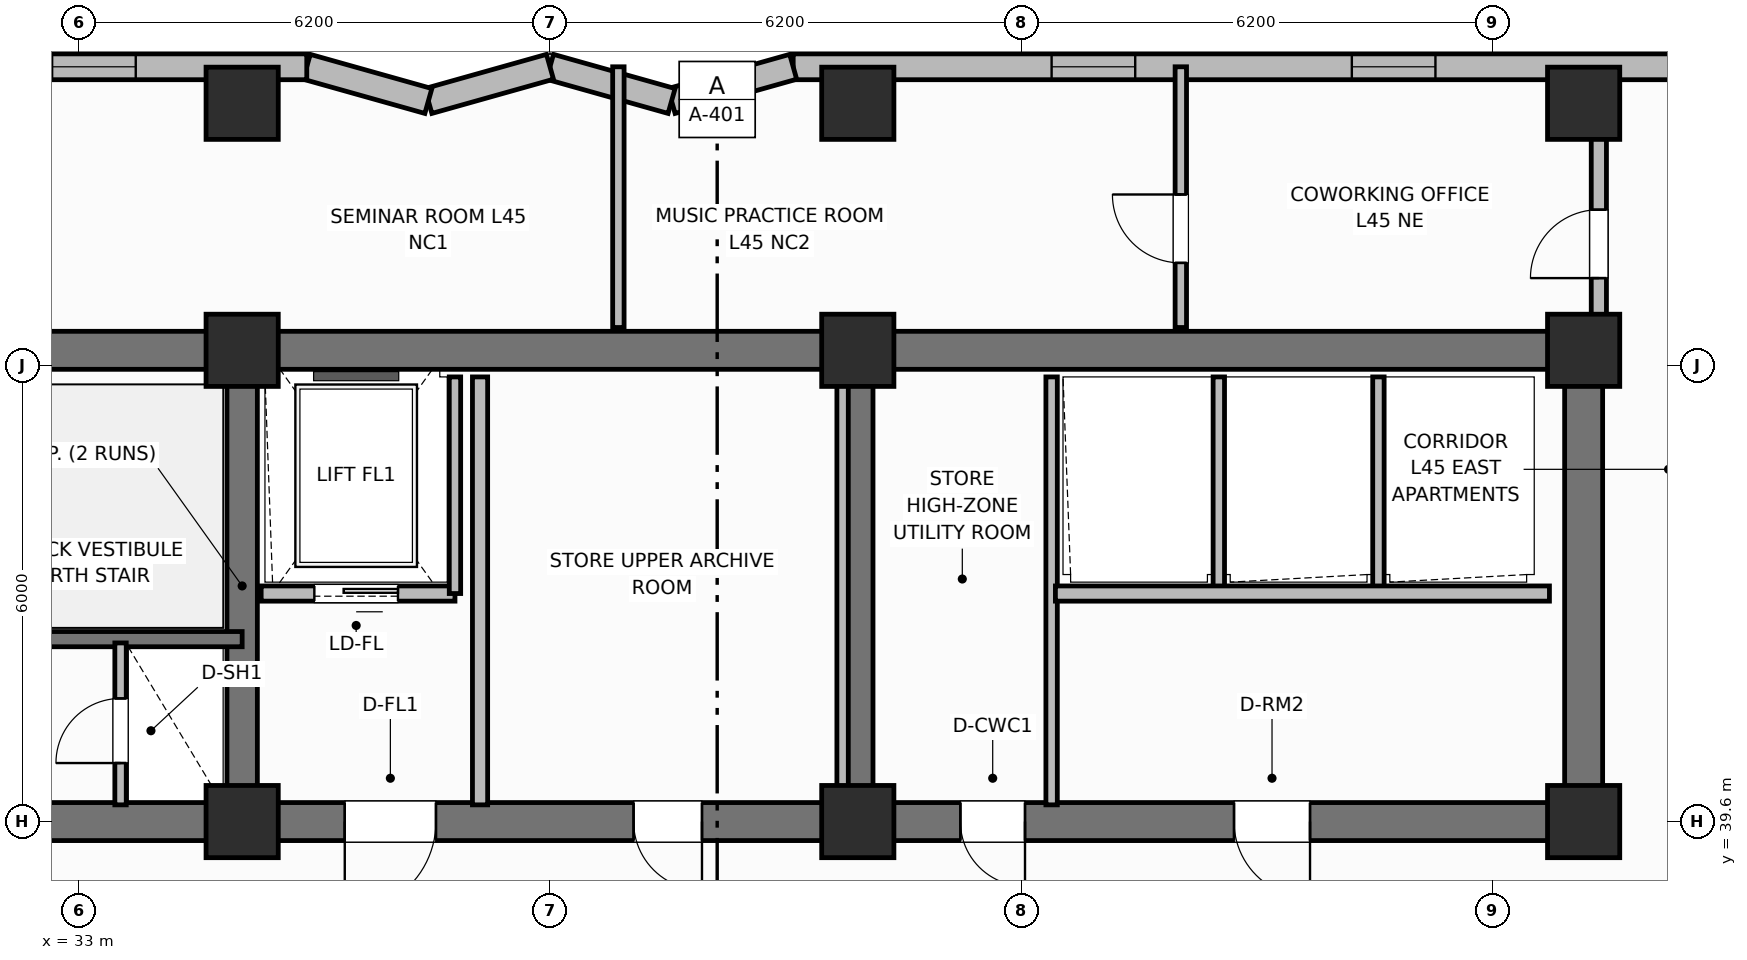
"""IFC4 building model, lengths in metres.
Left out: names, types, materials, properties, quantities, classifications, styles, units other than length and angle.
Written with IfcOpenShell. Run it as: python <this file> out.ifc"""

import sys

from ifc_helpers import new_model, si_unit, direction, frame, frame_2d, origin, origin_2d, place, context, subcontext, project, spatial, rectangle, extrude, element, fill, save


model = new_model("IFC4")
c1 = context("Model", 3, precision=1e-05, world=origin(), true_north=direction((0.0, 1.0)))
c2 = subcontext(c1, "Body", "Model", "MODEL_VIEW")
j1 = project(units=[si_unit("LENGTHUNIT", "METRE"), si_unit("PLANEANGLEUNIT", "RADIAN")], contexts=[c1])
p1 = place(None, origin())
s1 = spatial("IfcSite", under=j1, at=p1, CompositionType="ELEMENT")
p2 = place(p1, origin())
s2 = spatial("IfcBuilding", under=s1, at=p2, CompositionType="ELEMENT")
p3 = place(p2, frame((0.0, 0.0, 181.1)))
s3 = spatial("IfcBuildingStorey", under=s2, at=p3, CompositionType="ELEMENT", Elevation=181.1)
p4 = place(p3, frame((25.6, 45.8, 0.0), z_axis=(0.0, 0.0, 1.0), x_axis=(1.0, 0.0, 0.0)))
e1 = element("IfcWall", 1, at=p4, inside=s3, PredefinedType="SHEAR", context=c2, shape_type="SweptSolid", body=[
    extrude(rectangle(XDim=27.2, YDim=0.5, at=frame_2d((13.6, 0.0))), origin(), (0.0, 0.0, 1.0), 3.7),
])
p5 = place(p3, frame((52.8, 39.85, 0.0), z_axis=(0.0, 0.0, 1.0), x_axis=(0.0, 1.0, 0.0)))
e2 = element("IfcWall", 2, at=p5, inside=s3, PredefinedType="SHEAR", context=c2, shape_type="SweptSolid", body=[
    extrude(rectangle(XDim=5.7, YDim=0.5, at=frame_2d((2.85, 0.0))), origin(), (0.0, 0.0, 1.0), 3.7),
])
p6 = place(p3, frame((52.8, 39.6, 0.0), z_axis=(0.0, 0.0, 1.0), x_axis=(-1.0, 0.0, 0.0)))
e3 = element("IfcWall", 3, at=p6, inside=s3, PredefinedType="SHEAR", context=c2, shape_type="SweptSolid", body=[
    extrude(rectangle(XDim=27.2, YDim=0.5, at=frame_2d((13.6, 0.0))), origin(), (0.0, 0.0, 1.0), 3.7),
])
p7 = place(p6, frame((24.2, 0.0, 0.0)))
e4 = element("IfcOpeningElement", 4, at=p7, cuts=e3, PredefinedType="OPENING", context=c2, shape_type="SweptSolid", body=[
    extrude(rectangle(XDim=1.1, YDim=2.15, at=frame_2d((0.55, 1.075))), frame((0.0, 0.26, 0.0), z_axis=(0.0, -1.0, 0.0), x_axis=(1.0, 0.0, 0.0)), (0.0, 0.0, 1.0), 0.52),
])
p8 = place(p6, frame((15.1, 0.0, 0.0)))
e5 = element("IfcOpeningElement", 5, at=p8, cuts=e3, PredefinedType="OPENING", context=c2, shape_type="SweptSolid", body=[
    extrude(rectangle(XDim=1.2, YDim=2.15, at=frame_2d((0.6, 1.075))), frame((0.0, 0.26, 0.0), z_axis=(0.0, -1.0, 0.0), x_axis=(1.0, 0.0, 0.0)), (0.0, 0.0, 1.0), 0.52),
])
p9 = place(p6, frame((11.6, 0.0, 0.0)))
e6 = element("IfcOpeningElement", 6, at=p9, cuts=e3, PredefinedType="OPENING", context=c2, shape_type="SweptSolid", body=[
    extrude(rectangle(XDim=0.9, YDim=2.1, at=frame_2d((0.45, 1.05))), frame((0.0, 0.26, 0.0), z_axis=(0.0, -1.0, 0.0), x_axis=(1.0, 0.0, 0.0)), (0.0, 0.0, 1.0), 0.52),
])
p10 = place(p6, frame((7.35, 0.0, 0.0)))
e7 = element("IfcOpeningElement", 7, at=p10, cuts=e3, PredefinedType="OPENING", context=c2, shape_type="SweptSolid", body=[
    extrude(rectangle(XDim=0.85, YDim=2.1, at=frame_2d((0.425, 1.05))), frame((0.0, 0.26, 0.0), z_axis=(0.0, -1.0, 0.0), x_axis=(1.0, 0.0, 0.0)), (0.0, 0.0, 1.0), 0.52),
])
p11 = place(p6, frame((3.6, 0.0, 0.0)))
e8 = element("IfcOpeningElement", 8, at=p11, cuts=e3, PredefinedType="OPENING", context=c2, shape_type="SweptSolid", body=[
    extrude(rectangle(XDim=1.0, YDim=2.15, at=frame_2d((0.5, 1.075))), frame((0.0, 0.26, 0.0), z_axis=(0.0, -1.0, 0.0), x_axis=(1.0, 0.0, 0.0)), (0.0, 0.0, 1.0), 0.52),
])
for number, where, z_axis, x_axis in (
    (9, (35.15, 39.85, 0.0), (0.0, 0.0, 1.0), (0.0, 1.0, 0.0)),
    (10, (43.25, 39.85, 0.0), (0.0, 0.0, 1.0), (0.0, 1.0, 0.0)),
):
    element("IfcWall", number, at=place(p3, frame(where, z_axis=z_axis, x_axis=x_axis)), inside=s3, PredefinedType="SHEAR", context=c2, shape_type="SweptSolid", body=[
        extrude(rectangle(XDim=5.7, YDim=0.4, at=frame_2d((2.85, 0.0))), origin(), (0.0, 0.0, 1.0), 3.7),
    ])
for number, where, z_axis, x_axis in (
    (11, (35.15, 39.6, 0.0), (0.0, 0.0, 1.0), (1.0, 0.0, 0.0)),
    (12, (35.15, 45.8, 0.0), (0.0, 0.0, 1.0), (1.0, 0.0, 0.0)),
    (13, (43.25, 39.6, 0.0), (0.0, 0.0, 1.0), (1.0, 0.0, 0.0)),
    (14, (43.25, 45.8, 0.0), (0.0, 0.0, 1.0), (1.0, 0.0, 0.0)),
    (15, (52.8, 39.6, 0.0), (0.0, 0.0, 1.0), (1.0, 0.0, 0.0)),
    (16, (52.8, 45.8, 0.0), (0.0, 0.0, 1.0), (1.0, 0.0, 0.0)),
    (17, (35.15, 49.05, 0.0), (0.0, 0.0, 1.0), (1.0, 0.0, 0.0)),
    (18, (43.25, 49.05, 0.0), (0.0, 0.0, 1.0), (1.0, 0.0, 0.0)),
    (19, (52.8, 49.05, 0.0), (0.0, 0.0, 1.0), (1.0, 0.0, 0.0)),
):
    element("IfcColumn", number, at=place(p3, frame(where, z_axis=z_axis, x_axis=x_axis)), inside=s3, PredefinedType="COLUMN", context=c2, shape_type="SweptSolid", body=[
        extrude(rectangle(XDim=0.95, YDim=0.95, at=origin_2d()), origin(), (0.0, 0.0, 1.0), 3.7),
    ])
p12 = place(p3, frame((58.2, 49.53, 0.0), z_axis=(0.0, 0.0, 1.0), x_axis=(-1.0, 0.0, 0.0)))
e20 = element("IfcWall", 20, at=p12, inside=s3, PredefinedType="SOLIDWALL", context=c2, shape_type="SweptSolid", body=[
    extrude(rectangle(XDim=15.8, YDim=0.34, at=frame_2d((7.9, 0.0))), origin(), (0.0, 0.0, 1.0), 2.72),
])
p13 = place(p12, frame((1.55, 0.0, 0.95)))
e21 = element("IfcOpeningElement", 21, at=p13, cuts=e20, PredefinedType="OPENING", context=c2, shape_type="SweptSolid", body=[
    extrude(rectangle(XDim=1.1, YDim=1.65, at=frame_2d((0.55, 0.825))), frame((0.0, 0.18, 0.0), z_axis=(0.0, -1.0, 0.0), x_axis=(1.0, 0.0, 0.0)), (0.0, 0.0, 1.0), 0.36),
])
p14 = place(p12, frame((7.35, 0.0, 0.95)))
e22 = element("IfcOpeningElement", 22, at=p14, cuts=e20, PredefinedType="OPENING", context=c2, shape_type="SweptSolid", body=[
    extrude(rectangle(XDim=1.1, YDim=1.65, at=frame_2d((0.55, 0.825))), frame((0.0, 0.18, 0.0), z_axis=(0.0, -1.0, 0.0), x_axis=(1.0, 0.0, 0.0)), (0.0, 0.0, 1.0), 0.36),
])
p15 = place(p12, frame((11.3, 0.0, 0.95)))
e23 = element("IfcOpeningElement", 23, at=p15, cuts=e20, PredefinedType="OPENING", context=c2, shape_type="SweptSolid", body=[
    extrude(rectangle(XDim=1.1, YDim=1.65, at=frame_2d((0.55, 0.825))), frame((0.0, 0.18, 0.0), z_axis=(0.0, -1.0, 0.0), x_axis=(1.0, 0.0, 0.0)), (0.0, 0.0, 1.0), 0.36),
])
p16 = place(p3, frame((42.4, 49.53, 0.0), z_axis=(0.0, 0.0, 1.0), x_axis=(-0.962652136636, -0.270741322725, 0.0)))
e24 = element("IfcWall", 24, at=p16, inside=s3, PredefinedType="SOLIDWALL", context=c2, shape_type="SweptSolid", body=[
    extrude(rectangle(XDim=1.662, YDim=0.34, at=frame_2d((0.831, 0.0))), origin(), (0.0, 0.0, 1.0), 2.72),
])
p17 = place(p3, frame((40.8, 49.08, 0.0), z_axis=(0.0, 0.0, 1.0), x_axis=(-0.962662902433, 0.270703040766, 0.0)))
e25 = element("IfcWall", 25, at=p17, inside=s3, PredefinedType="SOLIDWALL", context=c2, shape_type="SweptSolid", body=[
    extrude(rectangle(XDim=1.662, YDim=0.34, at=frame_2d((0.831, 0.0))), origin(), (0.0, 0.0, 1.0), 2.72),
])
p18 = place(p3, frame((39.2, 49.53, 0.0), z_axis=(0.0, 0.0, 1.0), x_axis=(-0.962652136636, -0.270741322725, 0.0)))
e26 = element("IfcWall", 26, at=p18, inside=s3, PredefinedType="SOLIDWALL", context=c2, shape_type="SweptSolid", body=[
    extrude(rectangle(XDim=1.662, YDim=0.34, at=frame_2d((0.831, 0.0))), origin(), (0.0, 0.0, 1.0), 2.72),
])
p19 = place(p3, frame((37.6, 49.08, 0.0), z_axis=(0.0, 0.0, 1.0), x_axis=(-0.962662902433, 0.270703040766, 0.0)))
e27 = element("IfcWall", 27, at=p19, inside=s3, PredefinedType="SOLIDWALL", context=c2, shape_type="SweptSolid", body=[
    extrude(rectangle(XDim=1.662, YDim=0.34, at=frame_2d((0.831, 0.0))), origin(), (0.0, 0.0, 1.0), 2.72),
])
p20 = place(p3, frame((36.0, 49.53, 0.0), z_axis=(0.0, 0.0, 1.0), x_axis=(-1.0, 0.0, 0.0)))
e28 = element("IfcWall", 28, at=p20, inside=s3, PredefinedType="SOLIDWALL", context=c2, shape_type="SweptSolid", body=[
    extrude(rectangle(XDim=15.8, YDim=0.34, at=frame_2d((7.9, 0.0))), origin(), (0.0, 0.0, 1.0), 2.72),
])
p21 = place(p20, frame((2.25, 0.0, 0.95)))
e29 = element("IfcOpeningElement", 29, at=p21, cuts=e28, PredefinedType="OPENING", context=c2, shape_type="SweptSolid", body=[
    extrude(rectangle(XDim=1.1, YDim=1.65, at=frame_2d((0.55, 0.825))), frame((0.0, 0.18, 0.0), z_axis=(0.0, -1.0, 0.0), x_axis=(1.0, 0.0, 0.0)), (0.0, 0.0, 1.0), 0.36),
])
p22 = place(p20, frame((4.8, 0.0, 0.95)))
e30 = element("IfcOpeningElement", 30, at=p22, cuts=e28, PredefinedType="OPENING", context=c2, shape_type="SweptSolid", body=[
    extrude(rectangle(XDim=1.1, YDim=1.65, at=frame_2d((0.55, 0.825))), frame((0.0, 0.18, 0.0), z_axis=(0.0, -1.0, 0.0), x_axis=(1.0, 0.0, 0.0)), (0.0, 0.0, 1.0), 0.36),
])
p23 = place(p20, frame((7.35, 0.0, 0.95)))
e31 = element("IfcOpeningElement", 31, at=p23, cuts=e28, PredefinedType="OPENING", context=c2, shape_type="SweptSolid", body=[
    extrude(rectangle(XDim=1.1, YDim=1.65, at=frame_2d((0.55, 0.825))), frame((0.0, 0.18, 0.0), z_axis=(0.0, -1.0, 0.0), x_axis=(1.0, 0.0, 0.0)), (0.0, 0.0, 1.0), 0.36),
])
p24 = place(p20, frame((13.85, 0.0, 0.95)))
e32 = element("IfcOpeningElement", 32, at=p24, cuts=e28, PredefinedType="OPENING", context=c2, shape_type="SweptSolid", body=[
    extrude(rectangle(XDim=1.1, YDim=1.65, at=frame_2d((0.55, 0.825))), frame((0.0, 0.18, 0.0), z_axis=(0.0, -1.0, 0.0), x_axis=(1.0, 0.0, 0.0)), (0.0, 0.0, 1.0), 0.36),
])
p25 = place(p3, frame((35.15, 42.0, 0.0), z_axis=(0.0, 0.0, 1.0), x_axis=(-1.0, 0.0, 0.0)))
e33 = element("IfcWall", 33, at=p25, inside=s3, PredefinedType="SHEAR", context=c2, shape_type="SweptSolid", body=[
    extrude(rectangle(XDim=9.55, YDim=0.2, at=frame_2d((4.775, 0.0))), origin(), (0.0, 0.0, 1.0), 3.7),
])
p26 = place(p25, frame((7.25, 0.0, 0.0)))
e34 = element("IfcOpeningElement", 34, at=p26, cuts=e33, PredefinedType="OPENING", context=c2, shape_type="SweptSolid", body=[
    extrude(rectangle(XDim=1.1, YDim=2.15, at=frame_2d((0.55, 1.075))), frame((0.0, 0.11, 0.0), z_axis=(0.0, -1.0, 0.0), x_axis=(1.0, 0.0, 0.0)), (0.0, 0.0, 1.0), 0.22),
])
p27 = place(p3, frame((33.55, 39.82, 0.0), z_axis=(0.0, 0.0, 1.0), x_axis=(0.0, 1.0, 0.0)))
e35 = element("IfcWall", 35, at=p27, inside=s3, PredefinedType="PARTITIONING", context=c2, shape_type="SweptSolid", body=[
    extrude(rectangle(XDim=2.13, YDim=0.15, at=frame_2d((1.065, 0.0))), origin(), (0.0, 0.0, 1.0), 2.55),
])
p28 = place(p27, frame((0.55, 0.0, 0.0)))
e36 = element("IfcOpeningElement", 36, at=p28, cuts=e35, PredefinedType="OPENING", context=c2, shape_type="SweptSolid", body=[
    extrude(rectangle(XDim=0.85, YDim=2.05, at=frame_2d((0.425, 1.025))), frame((0.0, 0.085, 0.0), z_axis=(0.0, -1.0, 0.0), x_axis=(1.0, 0.0, 0.0)), (0.0, 0.0, 1.0), 0.17),
])
p29 = place(p3, frame((37.95, 42.6, 0.0), z_axis=(0.0, 0.0, 1.0), x_axis=(-1.0, 0.0, 0.0)))
e37 = element("IfcWall", 37, at=p29, inside=s3, PredefinedType="PARTITIONING", context=c2, shape_type="SweptSolid", body=[
    extrude(rectangle(XDim=2.55, YDim=0.2, at=frame_2d((1.275, 0.0))), origin(), (0.0, 0.0, 1.0), 2.32),
])
p30 = place(p29, frame((0.75, 0.0, 0.0)))
e38 = element("IfcOpeningElement", 38, at=p30, cuts=e37, PredefinedType="OPENING", context=c2, shape_type="SweptSolid", body=[
    extrude(rectangle(XDim=1.1, YDim=2.15, at=frame_2d((0.55, 1.075))), frame((0.0, 0.11, 0.0), z_axis=(0.0, -1.0, 0.0), x_axis=(1.0, 0.0, 0.0)), (0.0, 0.0, 1.0), 0.22),
])
p31 = place(p3, frame((37.95, 42.6, 0.0), z_axis=(0.0, 0.0, 1.0), x_axis=(0.0, 1.0, 0.0)))
e39 = element("IfcWall", 39, at=p31, inside=s3, PredefinedType="PARTITIONING", context=c2, shape_type="SweptSolid", body=[
    extrude(rectangle(XDim=2.85, YDim=0.15, at=frame_2d((1.425, 0.0))), origin(), (0.0, 0.0, 1.0), 2.55),
])
p32 = place(p3, frame((38.28, 39.82, 0.0), z_axis=(0.0, 0.0, 1.0), x_axis=(0.0, 1.0, 0.0)))
e40 = element("IfcWall", 40, at=p32, inside=s3, PredefinedType="PARTITIONING", context=c2, shape_type="SweptSolid", body=[
    extrude(rectangle(XDim=5.63, YDim=0.2, at=frame_2d((2.815, 0.0))), origin(), (0.0, 0.0, 1.0), 2.55),
])
for number, where, z_axis, x_axis in (
    (41, (43.05, 39.82, 0.0), (0.0, 0.0, 1.0), (0.0, 1.0, 0.0)),
    (42, (45.8, 39.82, 0.0), (0.0, 0.0, 1.0), (0.0, 1.0, 0.0)),
):
    element("IfcWall", number, at=place(p3, frame(where, z_axis=z_axis, x_axis=x_axis)), inside=s3, PredefinedType="PARTITIONING", context=c2, shape_type="SweptSolid", body=[
        extrude(rectangle(XDim=5.63, YDim=0.15, at=frame_2d((2.815, 0.0))), origin(), (0.0, 0.0, 1.0), 2.55),
    ])
for number, where, z_axis, x_axis in (
    (43, (48.0, 42.65, 0.0), (0.0, 0.0, 1.0), (0.0, 1.0, 0.0)),
    (44, (50.1, 42.65, 0.0), (0.0, 0.0, 1.0), (0.0, 1.0, 0.0)),
):
    element("IfcWall", number, at=place(p3, frame(where, z_axis=z_axis, x_axis=x_axis)), inside=s3, PredefinedType="PARTITIONING", context=c2, shape_type="SweptSolid", body=[
        extrude(rectangle(XDim=2.8, YDim=0.15, at=frame_2d((1.4, 0.0))), origin(), (0.0, 0.0, 1.0), 2.55),
    ])
p33 = place(p3, frame((52.35, 42.6, 0.0), z_axis=(0.0, 0.0, 1.0), x_axis=(-1.0, 0.0, 0.0)))
e45 = element("IfcWall", 45, at=p33, inside=s3, PredefinedType="PARTITIONING", context=c2, shape_type="SweptSolid", body=[
    extrude(rectangle(XDim=6.5, YDim=0.2, at=frame_2d((3.25, 0.0))), origin(), (0.0, 0.0, 1.0), 2.55),
])
p34 = place(p3, frame((40.1, 46.1, 0.0), z_axis=(0.0, 0.0, 1.0), x_axis=(0.0, 1.0, 0.0)))
e46 = element("IfcWall", 46, at=p34, inside=s3, PredefinedType="PARTITIONING", context=c2, shape_type="SweptSolid", body=[
    extrude(rectangle(XDim=3.43, YDim=0.15, at=frame_2d((1.715, 0.0))), origin(), (0.0, 0.0, 1.0), 2.55),
])
p35 = place(p3, frame((47.5, 46.1, 0.0), z_axis=(0.0, 0.0, 1.0), x_axis=(0.0, 1.0, 0.0)))
e47 = element("IfcWall", 47, at=p35, inside=s3, PredefinedType="PARTITIONING", context=c2, shape_type="SweptSolid", body=[
    extrude(rectangle(XDim=3.43, YDim=0.15, at=frame_2d((1.715, 0.0))), origin(), (0.0, 0.0, 1.0), 2.55),
])
p36 = place(p35, frame((0.85, 0.0, 0.0)))
e48 = element("IfcOpeningElement", 48, at=p36, cuts=e47, PredefinedType="OPENING", context=c2, shape_type="SweptSolid", body=[
    extrude(rectangle(XDim=0.9, YDim=2.1, at=frame_2d((0.45, 1.05))), frame((0.0, 0.085, 0.0), z_axis=(0.0, -1.0, 0.0), x_axis=(1.0, 0.0, 0.0)), (0.0, 0.0, 1.0), 0.17),
])
p37 = place(p3, frame((53.0, 46.1, 0.0), z_axis=(0.0, 0.0, 1.0), x_axis=(0.0, 1.0, 0.0)))
e49 = element("IfcWall", 49, at=p37, inside=s3, PredefinedType="PARTITIONING", context=c2, shape_type="SweptSolid", body=[
    extrude(rectangle(XDim=2.68, YDim=0.2, at=frame_2d((1.34, 0.0))), origin(), (0.0, 0.0, 1.0), 2.55),
])
p38 = place(p37, frame((0.65, 0.0, 0.0)))
e50 = element("IfcOpeningElement", 50, at=p38, cuts=e49, PredefinedType="OPENING", context=c2, shape_type="SweptSolid", body=[
    extrude(rectangle(XDim=0.9, YDim=2.1, at=frame_2d((0.45, 1.05))), frame((0.0, 0.11, 0.0), z_axis=(0.0, -1.0, 0.0), x_axis=(1.0, 0.0, 0.0)), (0.0, 0.0, 1.0), 0.22),
])
p39 = place(p14, origin())
e51 = element("IfcWindow", 51, at=p39, inside=s3, PartitioningType="SINGLE_PANEL", PredefinedType="WINDOW", context=c2, shape_type="SweptSolid", body=[
    extrude(rectangle(XDim=1.1, YDim=1.65, at=frame_2d((0.55, 0.825))), frame((0.0, 0.03, 0.0), z_axis=(0.0, -1.0, 0.0), x_axis=(1.0, 0.0, 0.0)), (0.0, 0.0, 1.0), 0.06),
])
fill(e22, e51)
p40 = place(p15, origin())
e52 = element("IfcWindow", 52, at=p40, inside=s3, PartitioningType="SINGLE_PANEL", PredefinedType="WINDOW", context=c2, shape_type="SweptSolid", body=[
    extrude(rectangle(XDim=1.1, YDim=1.65, at=frame_2d((0.55, 0.825))), frame((0.0, 0.03, 0.0), z_axis=(0.0, -1.0, 0.0), x_axis=(1.0, 0.0, 0.0)), (0.0, 0.0, 1.0), 0.06),
])
fill(e23, e52)
p41 = place(p21, origin())
e53 = element("IfcWindow", 53, at=p41, inside=s3, PartitioningType="SINGLE_PANEL", PredefinedType="WINDOW", context=c2, shape_type="SweptSolid", body=[
    extrude(rectangle(XDim=1.1, YDim=1.65, at=frame_2d((0.55, 0.825))), frame((0.0, 0.03, 0.0), z_axis=(0.0, -1.0, 0.0), x_axis=(1.0, 0.0, 0.0)), (0.0, 0.0, 1.0), 0.06),
])
fill(e29, e53)
p42 = place(p28, origin())
e54 = element("IfcDoor", 54, at=p42, inside=s3, OperationType="SINGLE_SWING_LEFT", PredefinedType="TRAPDOOR", context=c2, shape_type="SweptSolid", body=[
    extrude(rectangle(XDim=0.85, YDim=2.05, at=frame_2d((0.425, 1.025))), frame((0.0, 0.025, 0.0), z_axis=(0.0, -1.0, 0.0), x_axis=(1.0, 0.0, 0.0)), (0.0, 0.0, 1.0), 0.05),
])
fill(e36, e54)
p43 = place(p30, origin())
e55 = element("IfcDoor", 55, at=p43, inside=s3, OperationType="SLIDING_TO_LEFT", PredefinedType="DOOR", context=c2, shape_type="SweptSolid", body=[
    extrude(rectangle(XDim=1.1, YDim=2.15, at=frame_2d((0.55, 1.075))), frame((0.0, 0.025, 0.0), z_axis=(0.0, -1.0, 0.0), x_axis=(1.0, 0.0, 0.0)), (0.0, 0.0, 1.0), 0.05),
])
fill(e38, e55)
p44 = place(p36, origin())
e56 = element("IfcDoor", 56, at=p44, inside=s3, OperationType="SINGLE_SWING_RIGHT", PredefinedType="DOOR", context=c2, shape_type="SweptSolid", body=[
    extrude(rectangle(XDim=0.9, YDim=2.1, at=frame_2d((0.45, 1.05))), frame((0.0, 0.025, 0.0), z_axis=(0.0, -1.0, 0.0), x_axis=(1.0, 0.0, 0.0)), (0.0, 0.0, 1.0), 0.05),
])
fill(e48, e56)
p45 = place(p38, origin())
e57 = element("IfcDoor", 57, at=p45, inside=s3, OperationType="SINGLE_SWING_LEFT", PredefinedType="DOOR", context=c2, shape_type="SweptSolid", body=[
    extrude(rectangle(XDim=0.9, YDim=2.1, at=frame_2d((0.45, 1.05))), frame((0.0, 0.025, 0.0), z_axis=(0.0, -1.0, 0.0), x_axis=(1.0, 0.0, 0.0)), (0.0, 0.0, 1.0), 0.05),
])
fill(e50, e57)
p46 = place(p8, origin())
e58 = element("IfcDoor", 58, at=p46, inside=s3, OperationType="SINGLE_SWING_RIGHT", PredefinedType="DOOR", context=c2, shape_type="SweptSolid", body=[
    extrude(rectangle(XDim=1.2, YDim=2.15, at=frame_2d((0.6, 1.075))), frame((0.0, 0.025, 0.0), z_axis=(0.0, -1.0, 0.0), x_axis=(1.0, 0.0, 0.0)), (0.0, 0.0, 1.0), 0.05),
])
fill(e5, e58)
p47 = place(p9, origin())
e59 = element("IfcDoor", 59, at=p47, inside=s3, OperationType="SINGLE_SWING_LEFT", PredefinedType="DOOR", context=c2, shape_type="SweptSolid", body=[
    extrude(rectangle(XDim=0.9, YDim=2.1, at=frame_2d((0.45, 1.05))), frame((0.0, 0.025, 0.0), z_axis=(0.0, -1.0, 0.0), x_axis=(1.0, 0.0, 0.0)), (0.0, 0.0, 1.0), 0.05),
])
fill(e6, e59)
p48 = place(p10, origin())
e60 = element("IfcDoor", 60, at=p48, inside=s3, OperationType="SINGLE_SWING_LEFT", PredefinedType="DOOR", context=c2, shape_type="SweptSolid", body=[
    extrude(rectangle(XDim=0.85, YDim=2.1, at=frame_2d((0.425, 1.05))), frame((0.0, 0.025, 0.0), z_axis=(0.0, -1.0, 0.0), x_axis=(1.0, 0.0, 0.0)), (0.0, 0.0, 1.0), 0.05),
])
fill(e7, e60)
p49 = place(p11, origin())
e61 = element("IfcDoor", 61, at=p49, inside=s3, OperationType="SINGLE_SWING_LEFT", PredefinedType="DOOR", context=c2, shape_type="SweptSolid", body=[
    extrude(rectangle(XDim=1.0, YDim=2.15, at=frame_2d((0.5, 1.075))), frame((0.0, 0.025, 0.0), z_axis=(0.0, -1.0, 0.0), x_axis=(1.0, 0.0, 0.0)), (0.0, 0.0, 1.0), 0.05),
])
fill(e8, e61)
save(model, sys.argv[1])
